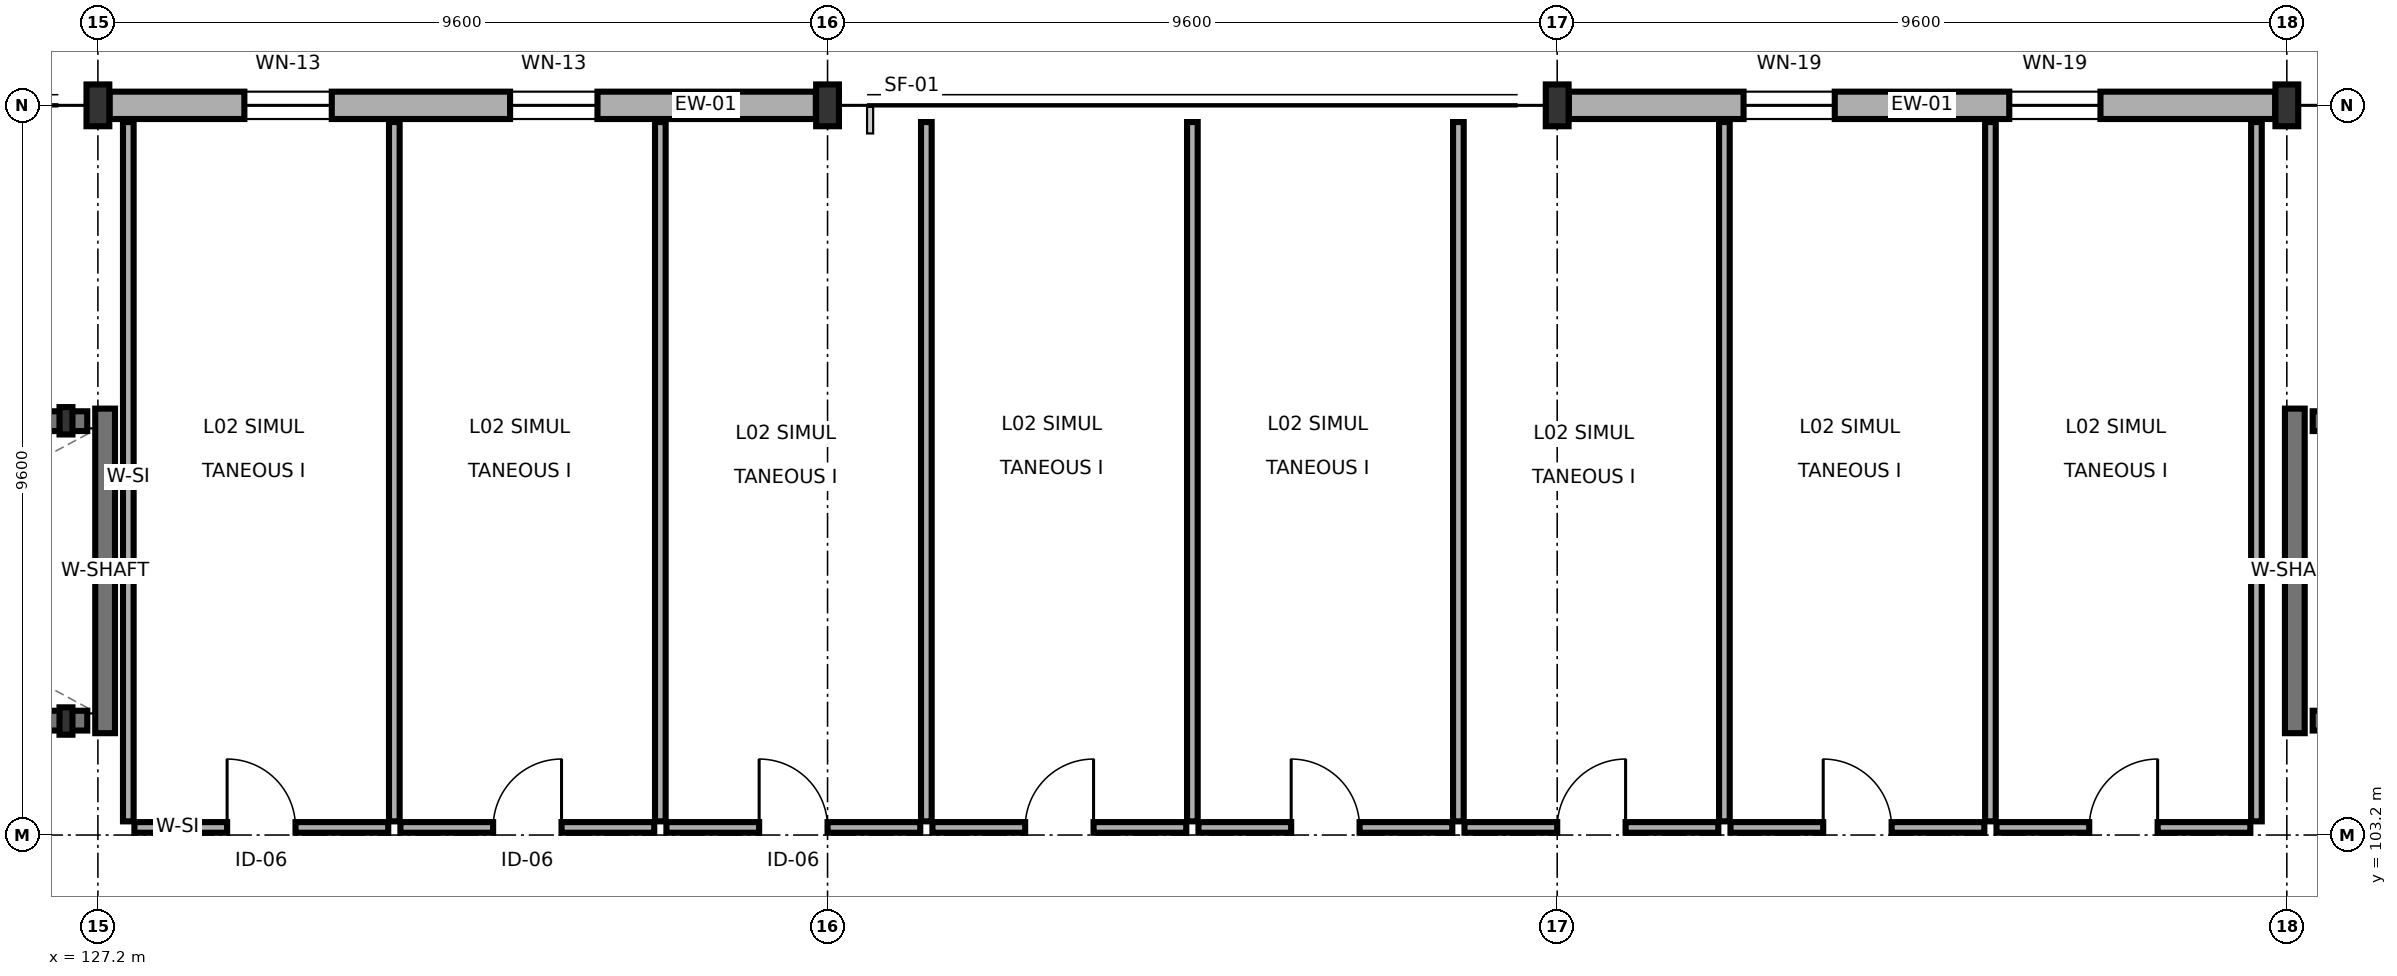
"""IFC4 building model, lengths in metres.
Left out: names, types, materials, properties, quantities, classifications, styles, units other than length and angle.
Written with IfcOpenShell. Run it as: python <this file> out.ifc"""

import sys

from ifc_helpers import new_model, si_unit, direction, frame, frame_2d, origin, origin_2d, place, context, subcontext, project, spatial, rectangle, i_section, extrude, element, fill, save


model = new_model("IFC4")
c1 = context("Model", 3, precision=1e-05, world=origin(), true_north=direction((0.0, 1.0)))
c2 = subcontext(c1, "Body", "Model", "MODEL_VIEW")
j1 = project(units=[si_unit("LENGTHUNIT", "METRE"), si_unit("PLANEANGLEUNIT", "RADIAN")], contexts=[c1])
p1 = place(None, origin())
s1 = spatial("IfcSite", under=j1, at=p1, CompositionType="ELEMENT")
p2 = place(p1, origin())
s2 = spatial("IfcBuilding", under=s1, at=p2, CompositionType="ELEMENT")
p3 = place(p2, frame((0.0, 0.0, 5.4)))
s3 = spatial("IfcBuildingStorey", under=s2, at=p3, CompositionType="ELEMENT", Elevation=5.4)
for number, where, z_axis, x_axis in (
    (1, (127.2, 112.8, 0.0), (0.0, 0.0, 1.0), (1.0, 0.0, 0.0)),
    (2, (136.8, 112.8, 0.0), (0.0, 0.0, 1.0), (1.0, 0.0, 0.0)),
    (3, (146.4, 112.8, 0.0), (0.0, 0.0, 1.0), (1.0, 0.0, 0.0)),
    (4, (156.0, 112.8, 0.0), (0.0, 0.0, 1.0), (1.0, 0.0, 0.0)),
):
    element("IfcColumn", number, at=place(p3, frame(where, z_axis=z_axis, x_axis=x_axis)), inside=s3, PredefinedType="COLUMN", context=c2, shape_type="SweptSolid", body=[
        extrude(i_section(OverallWidth=0.3, OverallDepth=0.55, WebThickness=0.015, FlangeThickness=0.029, FilletRadius=0.027, at=origin_2d()), origin(), (0.0, 0.0, 1.0), 4.5),
    ])
for number, where, z_axis, x_axis in (
    (5, (126.78, 104.7, 0.0), (0.0, 0.0, 1.0), (1.0, 0.0, 0.0)),
    (6, (126.78, 108.65, 0.0), (0.0, 0.0, 1.0), (1.0, 0.0, 0.0)),
):
    element("IfcColumn", number, at=place(p3, frame(where, z_axis=z_axis, x_axis=x_axis)), inside=s3, PredefinedType="PILASTER", context=c2, shape_type="SweptSolid", body=[
        extrude(i_section(OverallWidth=0.17, OverallDepth=0.36, WebThickness=0.008, FlangeThickness=0.013, FilletRadius=0.018, at=origin_2d()), origin(), (0.0, 0.0, 1.0), 4.5),
    ])
p4 = place(p3, frame((127.354, 112.8, 0.0), z_axis=(0.0, 0.0, 1.0), x_axis=(1.0, 0.0, 0.0)))
e7 = element("IfcWall", 7, at=p4, inside=s3, PredefinedType="SOLIDWALL", context=c2, shape_type="SweptSolid", body=[
    extrude(rectangle(XDim=9.292, YDim=0.36, at=frame_2d((4.646, 0.0))), origin(), (0.0, 0.0, 1.0), 3.685),
])
p5 = place(p4, frame((1.773, 0.0, 0.75)))
e8 = element("IfcOpeningElement", 8, at=p5, cuts=e7, PredefinedType="OPENING", context=c2, shape_type="SweptSolid", body=[
    extrude(rectangle(XDim=1.15, YDim=1.65, at=frame_2d((0.575, 0.825))), frame((0.0, 0.19, 0.0), z_axis=(0.0, -1.0, 0.0), x_axis=(1.0, 0.0, 0.0)), (0.0, 0.0, 1.0), 0.38),
])
p6 = place(p4, frame((5.269, 0.0, 0.75)))
e9 = element("IfcOpeningElement", 9, at=p6, cuts=e7, PredefinedType="OPENING", context=c2, shape_type="SweptSolid", body=[
    extrude(rectangle(XDim=1.15, YDim=1.65, at=frame_2d((0.575, 0.825))), frame((0.0, 0.19, 0.0), z_axis=(0.0, -1.0, 0.0), x_axis=(1.0, 0.0, 0.0)), (0.0, 0.0, 1.0), 0.38),
])
p7 = place(p3, frame((146.554, 112.8, 0.0), z_axis=(0.0, 0.0, 1.0), x_axis=(1.0, 0.0, 0.0)))
e10 = element("IfcWall", 10, at=p7, inside=s3, PredefinedType="SOLIDWALL", context=c2, shape_type="SweptSolid", body=[
    extrude(rectangle(XDim=9.292, YDim=0.36, at=frame_2d((4.646, 0.0))), origin(), (0.0, 0.0, 1.0), 3.685),
])
p8 = place(p7, frame((2.298, 0.0, 0.75)))
e11 = element("IfcOpeningElement", 11, at=p8, cuts=e10, PredefinedType="OPENING", context=c2, shape_type="SweptSolid", body=[
    extrude(rectangle(XDim=1.2, YDim=1.8, at=frame_2d((0.6, 0.9))), frame((0.0, 0.19, 0.0), z_axis=(0.0, -1.0, 0.0), x_axis=(1.0, 0.0, 0.0)), (0.0, 0.0, 1.0), 0.38),
])
p9 = place(p7, frame((5.794, 0.0, 0.75)))
e12 = element("IfcOpeningElement", 12, at=p9, cuts=e10, PredefinedType="OPENING", context=c2, shape_type="SweptSolid", body=[
    extrude(rectangle(XDim=1.2, YDim=1.8, at=frame_2d((0.6, 0.9))), frame((0.0, 0.19, 0.0), z_axis=(0.0, -1.0, 0.0), x_axis=(1.0, 0.0, 0.0)), (0.0, 0.0, 1.0), 0.38),
])
p10 = place(p3, frame((156.105, 104.54, 0.0), z_axis=(0.0, 0.0, 1.0), x_axis=(0.0, 1.0, 0.0)))
e13 = element("IfcWall", 13, at=p10, inside=s3, PredefinedType="SHEAR", context=c2, shape_type="SweptSolid", body=[
    extrude(rectangle(XDim=4.27, YDim=0.26, at=frame_2d((2.135, 0.0))), origin(), (0.0, 0.0, 1.0), 4.24),
])
p11 = place(p3, frame((156.34, 104.705, 0.0), z_axis=(0.0, 0.0, 1.0), x_axis=(1.0, 0.0, 0.0)))
e14 = element("IfcWall", 14, at=p11, inside=s3, PredefinedType="SHEAR", context=c2, shape_type="SweptSolid", body=[
    extrude(rectangle(XDim=8.52, YDim=0.26, at=frame_2d((4.26, 0.0))), origin(), (0.0, 0.0, 1.0), 4.24),
])
p12 = place(p11, frame((0.45, 0.0, 0.0)))
e15 = element("IfcOpeningElement", 15, at=p12, cuts=e14, PredefinedType="OPENING", context=c2, shape_type="SweptSolid", body=[
    extrude(rectangle(XDim=1.1, YDim=2.2, at=frame_2d((0.55, 1.1))), frame((0.0, 0.14, 0.0), z_axis=(0.0, -1.0, 0.0), x_axis=(1.0, 0.0, 0.0)), (0.0, 0.0, 1.0), 0.28),
])
p13 = place(p3, frame((156.34, 108.645, 0.0), z_axis=(0.0, 0.0, 1.0), x_axis=(1.0, 0.0, 0.0)))
e16 = element("IfcWall", 16, at=p13, inside=s3, PredefinedType="SHEAR", context=c2, shape_type="SweptSolid", body=[
    extrude(rectangle(XDim=8.52, YDim=0.26, at=frame_2d((4.26, 0.0))), origin(), (0.0, 0.0, 1.0), 4.24),
])
p14 = place(p3, frame((127.295, 104.54, 0.0), z_axis=(0.0, 0.0, 1.0), x_axis=(0.0, 1.0, 0.0)))
e17 = element("IfcWall", 17, at=p14, inside=s3, PredefinedType="SHEAR", context=c2, shape_type="SweptSolid", body=[
    extrude(rectangle(XDim=4.27, YDim=0.26, at=frame_2d((2.135, 0.0))), origin(), (0.0, 0.0, 1.0), 4.24),
])
p15 = place(p3, frame((118.54, 104.705, 0.0), z_axis=(0.0, 0.0, 1.0), x_axis=(1.0, 0.0, 0.0)))
e18 = element("IfcWall", 18, at=p15, inside=s3, PredefinedType="SHEAR", context=c2, shape_type="SweptSolid", body=[
    extrude(rectangle(XDim=8.52, YDim=0.26, at=frame_2d((4.26, 0.0))), origin(), (0.0, 0.0, 1.0), 4.24),
])
p16 = place(p15, frame((0.45, 0.0, 0.0)))
e19 = element("IfcOpeningElement", 19, at=p16, cuts=e18, PredefinedType="OPENING", context=c2, shape_type="SweptSolid", body=[
    extrude(rectangle(XDim=1.1, YDim=2.2, at=frame_2d((0.55, 1.1))), frame((0.0, 0.14, 0.0), z_axis=(0.0, -1.0, 0.0), x_axis=(1.0, 0.0, 0.0)), (0.0, 0.0, 1.0), 0.28),
])
p17 = place(p3, frame((118.54, 108.645, 0.0), z_axis=(0.0, 0.0, 1.0), x_axis=(1.0, 0.0, 0.0)))
e20 = element("IfcWall", 20, at=p17, inside=s3, PredefinedType="SHEAR", context=c2, shape_type="SweptSolid", body=[
    extrude(rectangle(XDim=8.52, YDim=0.26, at=frame_2d((4.26, 0.0))), origin(), (0.0, 0.0, 1.0), 4.24),
])
p18 = place(p3, frame((127.68, 103.3, 0.0), z_axis=(0.0, 0.0, 1.0), x_axis=(1.0, 0.0, 0.0)))
e21 = element("IfcWall", 21, at=p18, inside=s3, PredefinedType="PARTITIONING", context=c2, shape_type="SweptSolid", body=[
    extrude(rectangle(XDim=3.34, YDim=0.14, at=frame_2d((1.67, 0.0))), origin(), (0.0, 0.0, 1.0), 4.24),
])
p19 = place(p18, frame((1.22, 0.0, 0.0)))
e22 = element("IfcOpeningElement", 22, at=p19, cuts=e21, PredefinedType="OPENING", context=c2, shape_type="SweptSolid", body=[
    extrude(rectangle(XDim=0.9, YDim=2.15, at=frame_2d((0.45, 1.075))), frame((0.0, 0.08, 0.0), z_axis=(0.0, -1.0, 0.0), x_axis=(1.0, 0.0, 0.0)), (0.0, 0.0, 1.0), 0.16),
])
p20 = place(p3, frame((127.6, 103.38, 0.0), z_axis=(0.0, 0.0, 1.0), x_axis=(0.0, 1.0, 0.0)))
e23 = element("IfcWall", 23, at=p20, inside=s3, PredefinedType="PARTITIONING", context=c2, shape_type="SweptSolid", body=[
    extrude(rectangle(XDim=9.2, YDim=0.14, at=frame_2d((4.6, 0.0))), origin(), (0.0, 0.0, 1.0), 3.575),
])
p21 = place(p3, frame((131.18, 103.3, 0.0), z_axis=(0.0, 0.0, 1.0), x_axis=(1.0, 0.0, 0.0)))
e24 = element("IfcWall", 24, at=p21, inside=s3, PredefinedType="PARTITIONING", context=c2, shape_type="SweptSolid", body=[
    extrude(rectangle(XDim=3.34, YDim=0.14, at=frame_2d((1.67, 0.0))), origin(), (0.0, 0.0, 1.0), 4.24),
])
p22 = place(p21, frame((1.22, 0.0, 0.0)))
e25 = element("IfcOpeningElement", 25, at=p22, cuts=e24, PredefinedType="OPENING", context=c2, shape_type="SweptSolid", body=[
    extrude(rectangle(XDim=0.9, YDim=2.15, at=frame_2d((0.45, 1.075))), frame((0.0, 0.08, 0.0), z_axis=(0.0, -1.0, 0.0), x_axis=(1.0, 0.0, 0.0)), (0.0, 0.0, 1.0), 0.16),
])
p23 = place(p3, frame((131.1, 103.38, 0.0), z_axis=(0.0, 0.0, 1.0), x_axis=(0.0, 1.0, 0.0)))
e26 = element("IfcWall", 26, at=p23, inside=s3, PredefinedType="PARTITIONING", context=c2, shape_type="SweptSolid", body=[
    extrude(rectangle(XDim=9.2, YDim=0.14, at=frame_2d((4.6, 0.0))), origin(), (0.0, 0.0, 1.0), 3.575),
])
p24 = place(p3, frame((134.68, 103.3, 0.0), z_axis=(0.0, 0.0, 1.0), x_axis=(1.0, 0.0, 0.0)))
e27 = element("IfcWall", 27, at=p24, inside=s3, PredefinedType="PARTITIONING", context=c2, shape_type="SweptSolid", body=[
    extrude(rectangle(XDim=3.34, YDim=0.14, at=frame_2d((1.67, 0.0))), origin(), (0.0, 0.0, 1.0), 4.24),
])
p25 = place(p24, frame((1.22, 0.0, 0.0)))
e28 = element("IfcOpeningElement", 28, at=p25, cuts=e27, PredefinedType="OPENING", context=c2, shape_type="SweptSolid", body=[
    extrude(rectangle(XDim=0.9, YDim=2.15, at=frame_2d((0.45, 1.075))), frame((0.0, 0.08, 0.0), z_axis=(0.0, -1.0, 0.0), x_axis=(1.0, 0.0, 0.0)), (0.0, 0.0, 1.0), 0.16),
])
p26 = place(p3, frame((134.6, 103.38, 0.0), z_axis=(0.0, 0.0, 1.0), x_axis=(0.0, 1.0, 0.0)))
e29 = element("IfcWall", 29, at=p26, inside=s3, PredefinedType="PARTITIONING", context=c2, shape_type="SweptSolid", body=[
    extrude(rectangle(XDim=9.2, YDim=0.14, at=frame_2d((4.6, 0.0))), origin(), (0.0, 0.0, 1.0), 3.575),
])
p27 = place(p3, frame((138.18, 103.3, 0.0), z_axis=(0.0, 0.0, 1.0), x_axis=(1.0, 0.0, 0.0)))
e30 = element("IfcWall", 30, at=p27, inside=s3, PredefinedType="PARTITIONING", context=c2, shape_type="SweptSolid", body=[
    extrude(rectangle(XDim=3.34, YDim=0.14, at=frame_2d((1.67, 0.0))), origin(), (0.0, 0.0, 1.0), 4.24),
])
p28 = place(p27, frame((1.22, 0.0, 0.0)))
e31 = element("IfcOpeningElement", 31, at=p28, cuts=e30, PredefinedType="OPENING", context=c2, shape_type="SweptSolid", body=[
    extrude(rectangle(XDim=0.9, YDim=2.15, at=frame_2d((0.45, 1.075))), frame((0.0, 0.08, 0.0), z_axis=(0.0, -1.0, 0.0), x_axis=(1.0, 0.0, 0.0)), (0.0, 0.0, 1.0), 0.16),
])
p29 = place(p3, frame((138.1, 103.38, 0.0), z_axis=(0.0, 0.0, 1.0), x_axis=(0.0, 1.0, 0.0)))
e32 = element("IfcWall", 32, at=p29, inside=s3, PredefinedType="PARTITIONING", context=c2, shape_type="SweptSolid", body=[
    extrude(rectangle(XDim=9.2, YDim=0.14, at=frame_2d((4.6, 0.0))), origin(), (0.0, 0.0, 1.0), 3.575),
])
p30 = place(p3, frame((141.68, 103.3, 0.0), z_axis=(0.0, 0.0, 1.0), x_axis=(1.0, 0.0, 0.0)))
e33 = element("IfcWall", 33, at=p30, inside=s3, PredefinedType="PARTITIONING", context=c2, shape_type="SweptSolid", body=[
    extrude(rectangle(XDim=3.34, YDim=0.14, at=frame_2d((1.67, 0.0))), origin(), (0.0, 0.0, 1.0), 4.24),
])
p31 = place(p30, frame((1.22, 0.0, 0.0)))
e34 = element("IfcOpeningElement", 34, at=p31, cuts=e33, PredefinedType="OPENING", context=c2, shape_type="SweptSolid", body=[
    extrude(rectangle(XDim=0.9, YDim=2.15, at=frame_2d((0.45, 1.075))), frame((0.0, 0.08, 0.0), z_axis=(0.0, -1.0, 0.0), x_axis=(1.0, 0.0, 0.0)), (0.0, 0.0, 1.0), 0.16),
])
p32 = place(p3, frame((141.6, 103.38, 0.0), z_axis=(0.0, 0.0, 1.0), x_axis=(0.0, 1.0, 0.0)))
e35 = element("IfcWall", 35, at=p32, inside=s3, PredefinedType="PARTITIONING", context=c2, shape_type="SweptSolid", body=[
    extrude(rectangle(XDim=9.2, YDim=0.14, at=frame_2d((4.6, 0.0))), origin(), (0.0, 0.0, 1.0), 3.575),
])
p33 = place(p3, frame((145.18, 103.3, 0.0), z_axis=(0.0, 0.0, 1.0), x_axis=(1.0, 0.0, 0.0)))
e36 = element("IfcWall", 36, at=p33, inside=s3, PredefinedType="PARTITIONING", context=c2, shape_type="SweptSolid", body=[
    extrude(rectangle(XDim=3.34, YDim=0.14, at=frame_2d((1.67, 0.0))), origin(), (0.0, 0.0, 1.0), 4.24),
])
p34 = place(p33, frame((1.22, 0.0, 0.0)))
e37 = element("IfcOpeningElement", 37, at=p34, cuts=e36, PredefinedType="OPENING", context=c2, shape_type="SweptSolid", body=[
    extrude(rectangle(XDim=0.9, YDim=2.15, at=frame_2d((0.45, 1.075))), frame((0.0, 0.08, 0.0), z_axis=(0.0, -1.0, 0.0), x_axis=(1.0, 0.0, 0.0)), (0.0, 0.0, 1.0), 0.16),
])
p35 = place(p3, frame((145.1, 103.38, 0.0), z_axis=(0.0, 0.0, 1.0), x_axis=(0.0, 1.0, 0.0)))
e38 = element("IfcWall", 38, at=p35, inside=s3, PredefinedType="PARTITIONING", context=c2, shape_type="SweptSolid", body=[
    extrude(rectangle(XDim=9.2, YDim=0.14, at=frame_2d((4.6, 0.0))), origin(), (0.0, 0.0, 1.0), 3.575),
])
p36 = place(p3, frame((148.68, 103.3, 0.0), z_axis=(0.0, 0.0, 1.0), x_axis=(1.0, 0.0, 0.0)))
e39 = element("IfcWall", 39, at=p36, inside=s3, PredefinedType="PARTITIONING", context=c2, shape_type="SweptSolid", body=[
    extrude(rectangle(XDim=3.34, YDim=0.14, at=frame_2d((1.67, 0.0))), origin(), (0.0, 0.0, 1.0), 4.24),
])
p37 = place(p36, frame((1.22, 0.0, 0.0)))
e40 = element("IfcOpeningElement", 40, at=p37, cuts=e39, PredefinedType="OPENING", context=c2, shape_type="SweptSolid", body=[
    extrude(rectangle(XDim=0.9, YDim=2.15, at=frame_2d((0.45, 1.075))), frame((0.0, 0.08, 0.0), z_axis=(0.0, -1.0, 0.0), x_axis=(1.0, 0.0, 0.0)), (0.0, 0.0, 1.0), 0.16),
])
p38 = place(p3, frame((148.6, 103.38, 0.0), z_axis=(0.0, 0.0, 1.0), x_axis=(0.0, 1.0, 0.0)))
e41 = element("IfcWall", 41, at=p38, inside=s3, PredefinedType="PARTITIONING", context=c2, shape_type="SweptSolid", body=[
    extrude(rectangle(XDim=9.2, YDim=0.14, at=frame_2d((4.6, 0.0))), origin(), (0.0, 0.0, 1.0), 3.575),
])
p39 = place(p3, frame((152.18, 103.3, 0.0), z_axis=(0.0, 0.0, 1.0), x_axis=(1.0, 0.0, 0.0)))
e42 = element("IfcWall", 42, at=p39, inside=s3, PredefinedType="PARTITIONING", context=c2, shape_type="SweptSolid", body=[
    extrude(rectangle(XDim=3.34, YDim=0.14, at=frame_2d((1.67, 0.0))), origin(), (0.0, 0.0, 1.0), 4.24),
])
p40 = place(p39, frame((1.22, 0.0, 0.0)))
e43 = element("IfcOpeningElement", 43, at=p40, cuts=e42, PredefinedType="OPENING", context=c2, shape_type="SweptSolid", body=[
    extrude(rectangle(XDim=0.9, YDim=2.15, at=frame_2d((0.45, 1.075))), frame((0.0, 0.08, 0.0), z_axis=(0.0, -1.0, 0.0), x_axis=(1.0, 0.0, 0.0)), (0.0, 0.0, 1.0), 0.16),
])
for number, where, z_axis, x_axis in (
    (44, (152.1, 103.38, 0.0), (0.0, 0.0, 1.0), (0.0, 1.0, 0.0)),
    (45, (155.6, 103.38, 0.0), (0.0, 0.0, 1.0), (0.0, 1.0, 0.0)),
):
    element("IfcWall", number, at=place(p3, frame(where, z_axis=z_axis, x_axis=x_axis)), inside=s3, PredefinedType="PARTITIONING", context=c2, shape_type="SweptSolid", body=[
        extrude(rectangle(XDim=9.2, YDim=0.14, at=frame_2d((4.6, 0.0))), origin(), (0.0, 0.0, 1.0), 3.575),
    ])
p41 = place(p5, origin())
e46 = element("IfcWindow", 46, at=p41, inside=s3, PartitioningType="SINGLE_PANEL", PredefinedType="WINDOW", context=c2, shape_type="SweptSolid", body=[
    extrude(rectangle(XDim=1.15, YDim=1.65, at=frame_2d((0.575, 0.825))), frame((0.0, 0.03, 0.0), z_axis=(0.0, -1.0, 0.0), x_axis=(1.0, 0.0, 0.0)), (0.0, 0.0, 1.0), 0.06),
])
fill(e8, e46)
p42 = place(p6, origin())
e47 = element("IfcWindow", 47, at=p42, inside=s3, PartitioningType="SINGLE_PANEL", PredefinedType="WINDOW", context=c2, shape_type="SweptSolid", body=[
    extrude(rectangle(XDim=1.15, YDim=1.65, at=frame_2d((0.575, 0.825))), frame((0.0, 0.03, 0.0), z_axis=(0.0, -1.0, 0.0), x_axis=(1.0, 0.0, 0.0)), (0.0, 0.0, 1.0), 0.06),
])
fill(e9, e47)
p43 = place(p8, origin())
e48 = element("IfcWindow", 48, at=p43, inside=s3, PartitioningType="SINGLE_PANEL", PredefinedType="WINDOW", context=c2, shape_type="SweptSolid", body=[
    extrude(rectangle(XDim=1.2, YDim=1.8, at=frame_2d((0.6, 0.9))), frame((0.0, 0.03, 0.0), z_axis=(0.0, -1.0, 0.0), x_axis=(1.0, 0.0, 0.0)), (0.0, 0.0, 1.0), 0.06),
])
fill(e11, e48)
p44 = place(p9, origin())
e49 = element("IfcWindow", 49, at=p44, inside=s3, PartitioningType="SINGLE_PANEL", PredefinedType="WINDOW", context=c2, shape_type="SweptSolid", body=[
    extrude(rectangle(XDim=1.2, YDim=1.8, at=frame_2d((0.6, 0.9))), frame((0.0, 0.03, 0.0), z_axis=(0.0, -1.0, 0.0), x_axis=(1.0, 0.0, 0.0)), (0.0, 0.0, 1.0), 0.06),
])
fill(e12, e49)
p45 = place(p19, origin())
e50 = element("IfcDoor", 50, at=p45, inside=s3, OperationType="SINGLE_SWING_LEFT", PredefinedType="DOOR", context=c2, shape_type="SweptSolid", body=[
    extrude(rectangle(XDim=0.9, YDim=2.15, at=frame_2d((0.45, 1.075))), frame((0.0, 0.025, 0.0), z_axis=(0.0, -1.0, 0.0), x_axis=(1.0, 0.0, 0.0)), (0.0, 0.0, 1.0), 0.05),
])
fill(e22, e50)
p46 = place(p22, origin())
e51 = element("IfcDoor", 51, at=p46, inside=s3, OperationType="SINGLE_SWING_RIGHT", PredefinedType="DOOR", context=c2, shape_type="SweptSolid", body=[
    extrude(rectangle(XDim=0.9, YDim=2.15, at=frame_2d((0.45, 1.075))), frame((0.0, 0.025, 0.0), z_axis=(0.0, -1.0, 0.0), x_axis=(1.0, 0.0, 0.0)), (0.0, 0.0, 1.0), 0.05),
])
fill(e25, e51)
p47 = place(p25, origin())
e52 = element("IfcDoor", 52, at=p47, inside=s3, OperationType="SINGLE_SWING_LEFT", PredefinedType="DOOR", context=c2, shape_type="SweptSolid", body=[
    extrude(rectangle(XDim=0.9, YDim=2.15, at=frame_2d((0.45, 1.075))), frame((0.0, 0.025, 0.0), z_axis=(0.0, -1.0, 0.0), x_axis=(1.0, 0.0, 0.0)), (0.0, 0.0, 1.0), 0.05),
])
fill(e28, e52)
p48 = place(p28, origin())
e53 = element("IfcDoor", 53, at=p48, inside=s3, OperationType="SINGLE_SWING_RIGHT", PredefinedType="DOOR", context=c2, shape_type="SweptSolid", body=[
    extrude(rectangle(XDim=0.9, YDim=2.15, at=frame_2d((0.45, 1.075))), frame((0.0, 0.025, 0.0), z_axis=(0.0, -1.0, 0.0), x_axis=(1.0, 0.0, 0.0)), (0.0, 0.0, 1.0), 0.05),
])
fill(e31, e53)
p49 = place(p31, origin())
e54 = element("IfcDoor", 54, at=p49, inside=s3, OperationType="SINGLE_SWING_LEFT", PredefinedType="DOOR", context=c2, shape_type="SweptSolid", body=[
    extrude(rectangle(XDim=0.9, YDim=2.15, at=frame_2d((0.45, 1.075))), frame((0.0, 0.025, 0.0), z_axis=(0.0, -1.0, 0.0), x_axis=(1.0, 0.0, 0.0)), (0.0, 0.0, 1.0), 0.05),
])
fill(e34, e54)
p50 = place(p34, origin())
e55 = element("IfcDoor", 55, at=p50, inside=s3, OperationType="SINGLE_SWING_RIGHT", PredefinedType="DOOR", context=c2, shape_type="SweptSolid", body=[
    extrude(rectangle(XDim=0.9, YDim=2.15, at=frame_2d((0.45, 1.075))), frame((0.0, 0.025, 0.0), z_axis=(0.0, -1.0, 0.0), x_axis=(1.0, 0.0, 0.0)), (0.0, 0.0, 1.0), 0.05),
])
fill(e37, e55)
p51 = place(p37, origin())
e56 = element("IfcDoor", 56, at=p51, inside=s3, OperationType="SINGLE_SWING_LEFT", PredefinedType="DOOR", context=c2, shape_type="SweptSolid", body=[
    extrude(rectangle(XDim=0.9, YDim=2.15, at=frame_2d((0.45, 1.075))), frame((0.0, 0.025, 0.0), z_axis=(0.0, -1.0, 0.0), x_axis=(1.0, 0.0, 0.0)), (0.0, 0.0, 1.0), 0.05),
])
fill(e40, e56)
p52 = place(p40, origin())
e57 = element("IfcDoor", 57, at=p52, inside=s3, OperationType="SINGLE_SWING_RIGHT", PredefinedType="DOOR", context=c2, shape_type="SweptSolid", body=[
    extrude(rectangle(XDim=0.9, YDim=2.15, at=frame_2d((0.45, 1.075))), frame((0.0, 0.025, 0.0), z_axis=(0.0, -1.0, 0.0), x_axis=(1.0, 0.0, 0.0)), (0.0, 0.0, 1.0), 0.05),
])
fill(e43, e57)
save(model, sys.argv[1])
